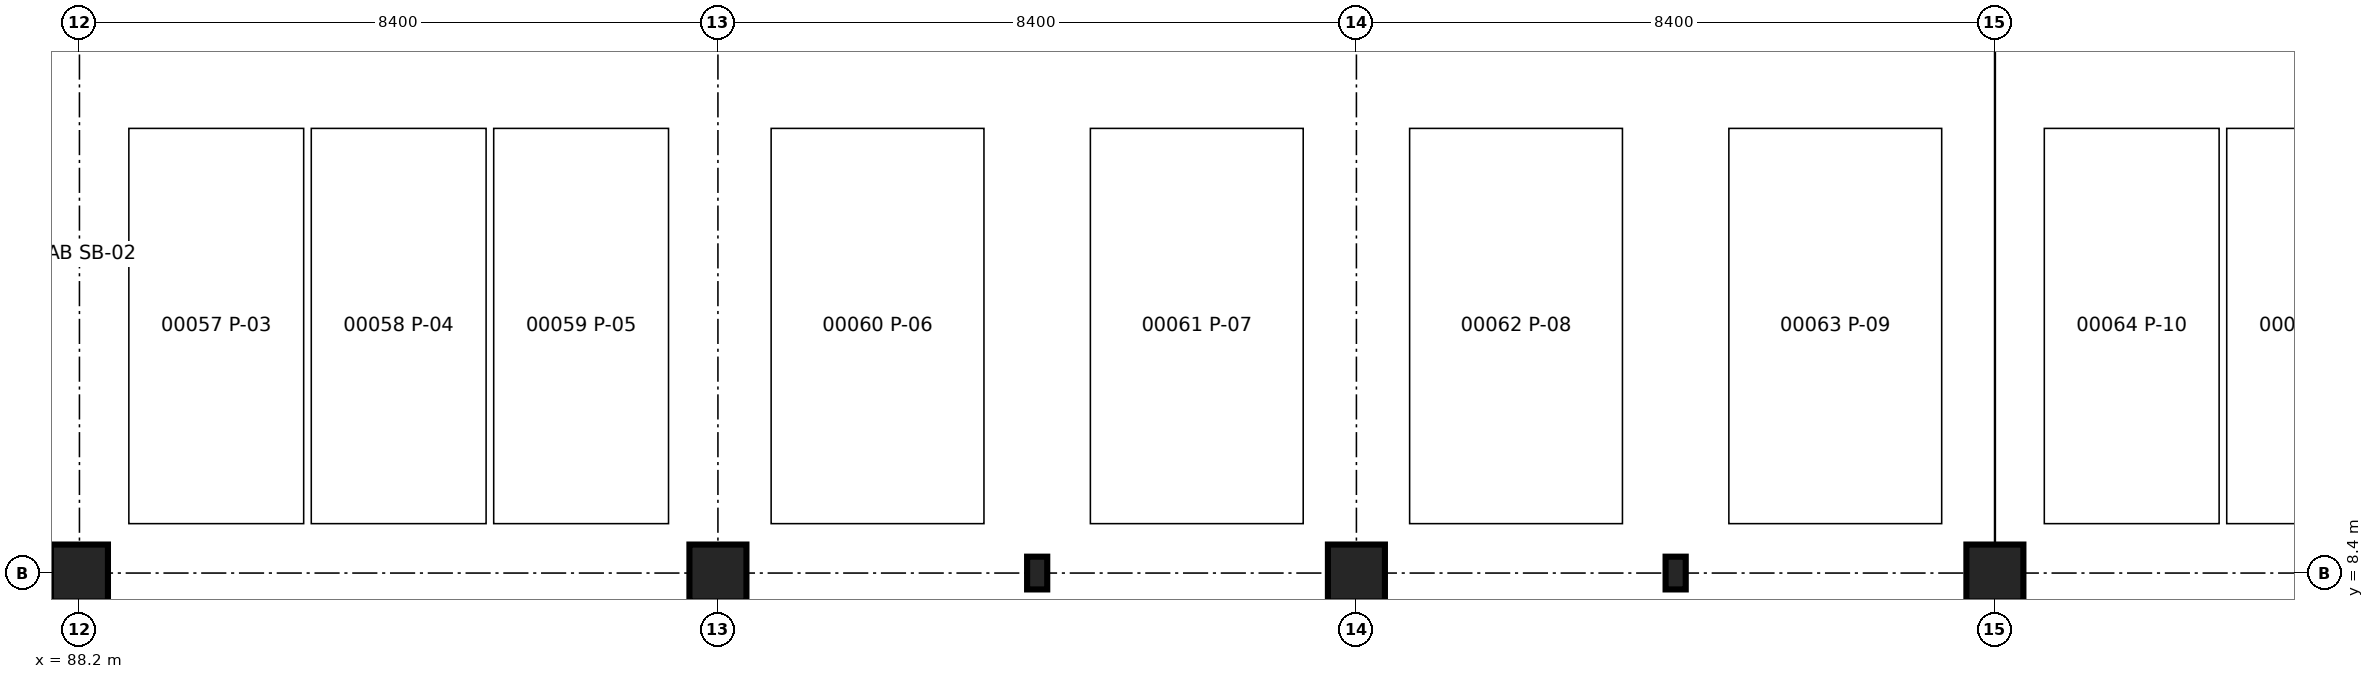
"""IFC4 building model, lengths in metres.
Left out: names, types, materials, properties, quantities, classifications, styles, units other than length and angle.
Written with IfcOpenShell. Run it as: python <this file> out.ifc"""

import sys

from ifc_helpers import new_model, si_unit, direction, frame, origin, origin_2d, place, context, subcontext, project, spatial, rectangle, i_section, extrude, element, save


model = new_model("IFC4")
c1 = context("Model", 3, precision=1e-05, world=origin(), true_north=direction((0.0, 1.0)))
c2 = subcontext(c1, "Body", "Model", "MODEL_VIEW")
j1 = project(units=[si_unit("LENGTHUNIT", "METRE"), si_unit("PLANEANGLEUNIT", "RADIAN")], contexts=[c1])
p1 = place(None, origin())
s1 = spatial("IfcSite", under=j1, at=p1, CompositionType="ELEMENT")
p2 = place(p1, origin())
s2 = spatial("IfcBuilding", under=s1, at=p2, CompositionType="ELEMENT")
p3 = place(p2, origin())
s3 = spatial("IfcBuildingStorey", under=s2, at=p3, CompositionType="ELEMENT", Elevation=0.0)
for number, where, z_axis, x_axis in (
    (1, (88.2, 8.4, 0.0), (0.0, 0.0, 1.0), (1.0, 0.0, 0.0)),
    (2, (96.6, 8.4, 0.0), (0.0, 0.0, 1.0), (1.0, 0.0, 0.0)),
    (3, (105.0, 8.4, 0.0), (0.0, 0.0, 1.0), (1.0, 0.0, 0.0)),
    (4, (113.4, 8.4, 0.0), (0.0, 0.0, 1.0), (1.0, 0.0, 0.0)),
):
    element("IfcColumn", number, at=place(p3, frame(where, z_axis=z_axis, x_axis=x_axis)), inside=s3, PredefinedType="COLUMN", context=c2, shape_type="SweptSolid", body=[
        extrude(rectangle(XDim=0.75, YDim=0.75, at=origin_2d()), origin(), (0.0, 0.0, 1.0), 5.1),
    ])
for number, where, z_axis, x_axis in (
    (5, (100.8, 8.4, 0.0), (0.0, 0.0, 1.0), (1.0, 0.0, 0.0)),
    (6, (109.2, 8.4, 0.0), (0.0, 0.0, 1.0), (1.0, 0.0, 0.0)),
):
    element("IfcColumn", number, at=place(p3, frame(where, z_axis=z_axis, x_axis=x_axis)), inside=s3, PredefinedType="COLUMN", context=c2, shape_type="SweptSolid", body=[
        extrude(i_section(OverallWidth=0.265, OverallDepth=0.431, WebThickness=0.015, FlangeThickness=0.025, at=origin_2d()), origin(), (0.0, 0.0, 1.0), 5.1),
    ])
save(model, sys.argv[1])
